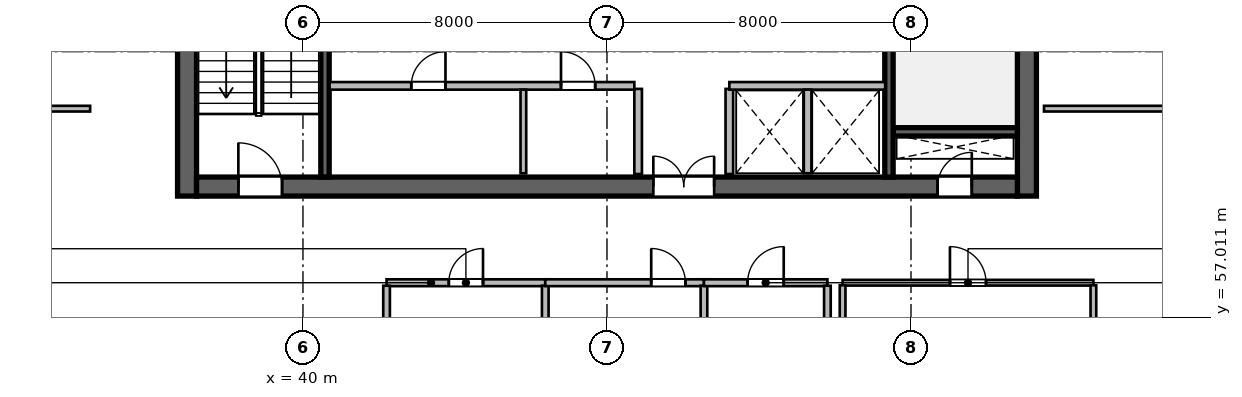
"""IFC4 building model, lengths in metres.
Left out: names, types, materials, properties, quantities, classifications, styles, units other than length and angle.
Written with IfcOpenShell. Run it as: python <this file> out.ifc"""

import sys

from ifc_helpers import new_model, si_unit, direction, frame, frame_2d, origin, place, context, subcontext, project, spatial, rectangle, extrude, source, transform, mapped, element, fill, save


model = new_model("IFC4")
c1 = context("Model", 3, precision=1e-05, world=origin(), true_north=direction((0.0, 1.0)))
c2 = subcontext(c1, "Body", "Model", "MODEL_VIEW")
j1 = project(units=[si_unit("LENGTHUNIT", "METRE"), si_unit("PLANEANGLEUNIT", "RADIAN")], contexts=[c1])
p1 = place(None, origin())
s1 = spatial("IfcSite", under=j1, at=p1, CompositionType="ELEMENT")
p2 = place(p1, origin())
s2 = spatial("IfcBuilding", under=s1, at=p2, CompositionType="ELEMENT")
p3 = place(p2, frame((0.0, 0.0, 146.7)))
s3 = spatial("IfcBuildingStorey", under=s2, at=p3, CompositionType="ELEMENT", Elevation=146.7)
m1 = source(origin(), c2, "Body", "SweptSolid", [
    extrude(rectangle(XDim=12.0, YDim=0.5, at=frame_2d((6.0, 0.0))), origin(), (0.0, 0.0, 1.0), 3.9),
])
for number, where, z_axis, x_axis in (
    (1, (36.95, 60.2, 0.0), (0.0, 0.0, 1.0), (0.0, 1.0, 0.0)),
    (2, (59.05, 60.2, 0.0), (0.0, 0.0, 1.0), (0.0, 1.0, 0.0)),
):
    element("IfcWall", number, at=place(p3, frame(where, z_axis=z_axis, x_axis=x_axis)), inside=s3, PredefinedType="SHEAR", context=c2, shape_type="MappedRepresentation", body=[
        mapped(m1, transform((0.0, 0.0, 0.0), scale=1.0)),
    ])
m2 = source(origin(), c2, "Body", "SweptSolid", [
    extrude(rectangle(XDim=21.6, YDim=0.5, at=frame_2d((10.8, 0.0))), origin(), (0.0, 0.0, 1.0), 3.9),
])
p4 = place(p3, frame((37.2, 60.45, 0.0), z_axis=(0.0, 0.0, 1.0), x_axis=(1.0, 0.0, 0.0)))
e3 = element("IfcWall", 3, at=p4, inside=s3, PredefinedType="SHEAR", context=c2, shape_type="MappedRepresentation", body=[
    mapped(m2, transform((0.0, 0.0, 0.0), scale=1.0)),
])
p5 = place(p4, frame((1.1, 0.0, 0.0)))
e4 = element("IfcOpeningElement", 4, at=p5, cuts=e3, PredefinedType="OPENING", context=c2, shape_type="SweptSolid", body=[
    extrude(rectangle(XDim=1.15, YDim=2.15, at=frame_2d((0.575, 1.075))), frame((0.0, 0.26, 0.0), z_axis=(0.0, -1.0, 0.0), x_axis=(1.0, 0.0, 0.0)), (0.0, 0.0, 1.0), 0.52),
])
p6 = place(p4, frame((19.5, 0.0, 0.0)))
e5 = element("IfcOpeningElement", 5, at=p6, cuts=e3, PredefinedType="OPENING", context=c2, shape_type="SweptSolid", body=[
    extrude(rectangle(XDim=0.9, YDim=2.1, at=frame_2d((0.45, 1.05))), frame((0.0, 0.26, 0.0), z_axis=(0.0, -1.0, 0.0), x_axis=(1.0, 0.0, 0.0)), (0.0, 0.0, 1.0), 0.52),
])
p7 = place(p4, frame((12.02, 0.0, 0.0)))
e6 = element("IfcOpeningElement", 6, at=p7, cuts=e3, PredefinedType="OPENING", context=c2, shape_type="SweptSolid", body=[
    extrude(rectangle(XDim=1.6, YDim=2.15, at=frame_2d((0.8, 1.075))), frame((0.0, 0.26, 0.0), z_axis=(0.0, -1.0, 0.0), x_axis=(1.0, 0.0, 0.0)), (0.0, 0.0, 1.0), 0.52),
])
m3 = source(origin(), c2, "Body", "SweptSolid", [
    extrude(rectangle(XDim=3.27, YDim=0.22, at=frame_2d((1.635, 0.0))), origin(), (0.0, 0.0, 1.0), 3.9),
])
p8 = place(p3, frame((55.53, 61.89, 0.0), z_axis=(0.0, 0.0, 1.0), x_axis=(1.0, 0.0, 0.0)))
e7 = element("IfcWall", 7, at=p8, inside=s3, PredefinedType="SHEAR", context=c2, shape_type="MappedRepresentation", body=[
    mapped(m3, transform((0.0, 0.0, 0.0), scale=1.0)),
])
m4 = source(origin(), c2, "Body", "SweptSolid", [
    extrude(rectangle(XDim=11.0, YDim=0.22, at=frame_2d((5.5, 0.0))), origin(), (0.0, 0.0, 1.0), 3.9),
])
p9 = place(p3, frame((40.58, 60.7, 0.0), z_axis=(0.0, 0.0, 1.0), x_axis=(0.0, 1.0, 0.0)))
e8 = element("IfcWall", 8, at=p9, inside=s3, PredefinedType="SHEAR", context=c2, shape_type="MappedRepresentation", body=[
    mapped(m4, transform((0.0, 0.0, 0.0), scale=1.0)),
])
p10 = place(p3, frame((55.42, 60.7, 0.0), z_axis=(0.0, 0.0, 1.0), x_axis=(0.0, 1.0, 0.0)))
e9 = element("IfcWall", 9, at=p10, inside=s3, PredefinedType="SHEAR", context=c2, shape_type="MappedRepresentation", body=[
    mapped(m4, transform((0.0, 0.0, 0.0), scale=1.0)),
])
p11 = place(p10, frame((9.545, 0.0, 0.0)))
e10 = element("IfcOpeningElement", 10, at=p11, cuts=e9, PredefinedType="OPENING", context=c2, shape_type="SweptSolid", body=[
    extrude(rectangle(XDim=1.15, YDim=2.15, at=frame_2d((0.575, 1.075))), frame((0.0, 0.12, 0.0), z_axis=(0.0, -1.0, 0.0), x_axis=(1.0, 0.0, 0.0)), (0.0, 0.0, 1.0), 0.24),
])
m5 = source(origin(), c2, "Body", "SweptSolid", [
    extrude(rectangle(XDim=2.24, YDim=0.2, at=frame_2d((1.12, 0.0))), origin(), (0.0, 0.0, 1.0), 3.65),
])
for number, where, z_axis, x_axis in (
    (11, (48.82, 60.78, 0.0), (0.0, 0.0, 1.0), (0.0, 1.0, 0.0)),
    (12, (51.22, 60.78, 0.0), (0.0, 0.0, 1.0), (0.0, 1.0, 0.0)),
):
    element("IfcWall", number, at=place(p3, frame(where, z_axis=z_axis, x_axis=x_axis)), inside=s3, PredefinedType="SOLIDWALL", context=c2, shape_type="MappedRepresentation", body=[
        mapped(m5, transform((0.0, 0.0, 0.0), scale=1.0)),
    ])
m6 = source(origin(), c2, "Body", "SweptSolid", [
    extrude(rectangle(XDim=8.02, YDim=0.2, at=frame_2d((4.01, 0.0))), origin(), (0.0, 0.0, 1.0), 3.65),
])
p12 = place(p3, frame((40.7, 63.1, 0.0), z_axis=(0.0, 0.0, 1.0), x_axis=(1.0, 0.0, 0.0)))
e13 = element("IfcWall", 13, at=p12, inside=s3, PredefinedType="SOLIDWALL", context=c2, shape_type="MappedRepresentation", body=[
    mapped(m6, transform((0.0, 0.0, 0.0), scale=1.0)),
])
p13 = place(p12, frame((2.15, 0.0, 0.0)))
e14 = element("IfcOpeningElement", 14, at=p13, cuts=e13, PredefinedType="OPENING", context=c2, shape_type="SweptSolid", body=[
    extrude(rectangle(XDim=0.9, YDim=2.1, at=frame_2d((0.45, 1.05))), frame((0.0, 0.11, 0.0), z_axis=(0.0, -1.0, 0.0), x_axis=(1.0, 0.0, 0.0)), (0.0, 0.0, 1.0), 0.22),
])
p14 = place(p12, frame((6.09, 0.0, 0.0)))
e15 = element("IfcOpeningElement", 15, at=p14, cuts=e13, PredefinedType="OPENING", context=c2, shape_type="SweptSolid", body=[
    extrude(rectangle(XDim=0.9, YDim=2.1, at=frame_2d((0.45, 1.05))), frame((0.0, 0.11, 0.0), z_axis=(0.0, -1.0, 0.0), x_axis=(1.0, 0.0, 0.0)), (0.0, 0.0, 1.0), 0.22),
])
m7 = source(origin(), c2, "Body", "SweptSolid", [
    extrude(rectangle(XDim=4.1, YDim=0.2, at=frame_2d((2.05, 0.0))), origin(), (0.0, 0.0, 1.0), 3.65),
])
p15 = place(p3, frame((51.22, 63.1, 0.0), z_axis=(0.0, 0.0, 1.0), x_axis=(1.0, 0.0, 0.0)))
e16 = element("IfcWall", 16, at=p15, inside=s3, PredefinedType="SOLIDWALL", context=c2, shape_type="MappedRepresentation", body=[
    mapped(m7, transform((0.0, 0.0, 0.0), scale=1.0)),
])
m8 = source(origin(), c2, "Body", "SweptSolid", [
    extrude(rectangle(XDim=2.2, YDim=0.15, at=frame_2d((1.1, 0.0))), origin(), (0.0, 0.0, 1.0), 3.65),
])
p16 = place(p3, frame((45.8, 60.8, 0.0), z_axis=(0.0, 0.0, 1.0), x_axis=(0.0, 1.0, 0.0)))
e17 = element("IfcWall", 17, at=p16, inside=s3, PredefinedType="PARTITIONING", context=c2, shape_type="MappedRepresentation", body=[
    mapped(m8, transform((0.0, 0.0, 0.0), scale=1.0)),
])
m9 = source(origin(), c2, "Body", "SweptSolid", [
    extrude(rectangle(XDim=2.2, YDim=0.2, at=frame_2d((1.1, 0.0))), origin(), (0.0, 0.0, 1.0), 3.65),
])
p17 = place(p3, frame((53.28, 60.8, 0.0), z_axis=(0.0, 0.0, 1.0), x_axis=(0.0, 1.0, 0.0)))
e18 = element("IfcWall", 18, at=p17, inside=s3, PredefinedType="SOLIDWALL", context=c2, shape_type="MappedRepresentation", body=[
    mapped(m9, transform((0.0, 0.0, 0.0), scale=1.0)),
])
m10 = source(origin(), c2, "Body", "SweptSolid", [
    extrude(rectangle(XDim=4.176, YDim=0.18, at=frame_2d((2.088, 0.0))), origin(), (0.0, 0.0, 1.0), 3.65),
])
p18 = place(p3, frame((42.2, 57.92, 0.0), z_axis=(0.0, 0.0, 1.0), x_axis=(1.0, 0.0, 0.0)))
e19 = element("IfcWall", 19, at=p18, inside=s3, PredefinedType="PLUMBINGWALL", context=c2, shape_type="MappedRepresentation", body=[
    mapped(m10, transform((0.0, 0.0, 0.0), scale=1.0)),
])
p19 = place(p18, frame((1.638, 0.0, 0.0)))
e20 = element("IfcOpeningElement", 20, at=p19, cuts=e19, PredefinedType="OPENING", context=c2, shape_type="SweptSolid", body=[
    extrude(rectangle(XDim=0.9, YDim=2.08, at=frame_2d((0.45, 1.04))), frame((0.0, 0.1, 0.0), z_axis=(0.0, -1.0, 0.0), x_axis=(1.0, 0.0, 0.0)), (0.0, 0.0, 1.0), 0.2),
])
m11 = source(origin(), c2, "Body", "SweptSolid", [
    extrude(rectangle(XDim=3.763, YDim=0.175, at=frame_2d((1.881, 0.0))), origin(), (0.0, 0.0, 1.0), 3.65),
])
p20 = place(p3, frame((42.2, 54.079, 0.0), z_axis=(0.0, 0.0, 1.0), x_axis=(0.0, 1.0, 0.0)))
e21 = element("IfcWall", 21, at=p20, inside=s3, PredefinedType="PARTITIONING", context=c2, shape_type="MappedRepresentation", body=[
    mapped(m11, transform((0.0, 0.0, 0.0), scale=1.0)),
])
m12 = source(origin(), c2, "Body", "SweptSolid", [
    extrude(rectangle(XDim=3.065, YDim=0.175, at=frame_2d((1.533, 0.0))), origin(), (0.0, 0.0, 1.0), 3.65),
])
p21 = place(p3, frame((46.376, 54.776, 0.0), z_axis=(0.0, 0.0, 1.0), x_axis=(0.0, 1.0, 0.0)))
e22 = element("IfcWall", 22, at=p21, inside=s3, PredefinedType="PARTITIONING", context=c2, shape_type="MappedRepresentation", body=[
    mapped(m12, transform((0.0, 0.0, 0.0), scale=1.0)),
])
p22 = place(p3, frame((46.376, 57.92, 0.0), z_axis=(0.0, 0.0, 1.0), x_axis=(1.0, 0.0, 0.0)))
e23 = element("IfcWall", 23, at=p22, inside=s3, PredefinedType="PLUMBINGWALL", context=c2, shape_type="MappedRepresentation", body=[
    mapped(m10, transform((0.0, 0.0, 0.0), scale=1.0)),
])
p23 = place(p22, frame((2.788, 0.0, 0.0)))
e24 = element("IfcOpeningElement", 24, at=p23, cuts=e23, PredefinedType="OPENING", context=c2, shape_type="SweptSolid", body=[
    extrude(rectangle(XDim=0.9, YDim=2.08, at=frame_2d((0.45, 1.04))), frame((0.0, 0.1, 0.0), z_axis=(0.0, -1.0, 0.0), x_axis=(1.0, 0.0, 0.0)), (0.0, 0.0, 1.0), 0.2),
])
m13 = source(origin(), c2, "Body", "SweptSolid", [
    extrude(rectangle(XDim=3.136, YDim=0.175, at=frame_2d((1.568, 0.0))), origin(), (0.0, 0.0, 1.0), 3.65),
])
p24 = place(p3, frame((50.552, 54.705, 0.0), z_axis=(0.0, 0.0, 1.0), x_axis=(0.0, 1.0, 0.0)))
e25 = element("IfcWall", 25, at=p24, inside=s3, PredefinedType="PARTITIONING", context=c2, shape_type="MappedRepresentation", body=[
    mapped(m13, transform((0.0, 0.0, 0.0), scale=1.0)),
])
m14 = source(origin(), c2, "Body", "SweptSolid", [
    extrude(rectangle(XDim=3.248, YDim=0.18, at=frame_2d((1.624, 0.0))), origin(), (0.0, 0.0, 1.0), 3.65),
])
p25 = place(p3, frame((50.552, 57.92, 0.0), z_axis=(0.0, 0.0, 1.0), x_axis=(1.0, 0.0, 0.0)))
e26 = element("IfcWall", 26, at=p25, inside=s3, PredefinedType="PLUMBINGWALL", context=c2, shape_type="MappedRepresentation", body=[
    mapped(m14, transform((0.0, 0.0, 0.0), scale=1.0)),
])
p26 = place(p25, frame((1.149, 0.0, 0.0)))
e27 = element("IfcOpeningElement", 27, at=p26, cuts=e26, PredefinedType="OPENING", context=c2, shape_type="SweptSolid", body=[
    extrude(rectangle(XDim=0.95, YDim=2.12, at=frame_2d((0.475, 1.06))), frame((0.0, 0.1, 0.0), z_axis=(0.0, -1.0, 0.0), x_axis=(1.0, 0.0, 0.0)), (0.0, 0.0, 1.0), 0.2),
])
p27 = place(p3, frame((53.8, 54.079, 0.0), z_axis=(0.0, 0.0, 1.0), x_axis=(0.0, 1.0, 0.0)))
e28 = element("IfcWall", 28, at=p27, inside=s3, PredefinedType="PARTITIONING", context=c2, shape_type="MappedRepresentation", body=[
    mapped(m11, transform((0.0, 0.0, 0.0), scale=1.0)),
])
m15 = source(origin(), c2, "Body", "SweptSolid", [
    extrude(rectangle(XDim=6.6, YDim=0.15, at=frame_2d((3.3, 0.0))), origin(), (0.0, 0.0, 1.0), 3.65),
])
p28 = place(p3, frame((54.2, 57.92, 0.0), z_axis=(0.0, 0.0, 1.0), x_axis=(1.0, 0.0, 0.0)))
e29 = element("IfcWall", 29, at=p28, inside=s3, PredefinedType="PARTITIONING", context=c2, shape_type="MappedRepresentation", body=[
    mapped(m15, transform((0.0, 0.0, 0.0), scale=1.0)),
])
p29 = place(p28, frame((2.825, 0.0, 0.0)))
e30 = element("IfcOpeningElement", 30, at=p29, cuts=e29, PredefinedType="OPENING", context=c2, shape_type="SweptSolid", body=[
    extrude(rectangle(XDim=0.95, YDim=2.1, at=frame_2d((0.475, 1.05))), frame((0.0, 0.085, 0.0), z_axis=(0.0, -1.0, 0.0), x_axis=(1.0, 0.0, 0.0)), (0.0, 0.0, 1.0), 0.17),
])
m16 = source(origin(), c2, "Body", "SweptSolid", [
    extrude(rectangle(XDim=3.785, YDim=0.15, at=frame_2d((1.893, 0.0))), origin(), (0.0, 0.0, 1.0), 3.65),
])
for number, where, z_axis, x_axis in (
    (31, (54.2, 54.067, 0.0), (0.0, 0.0, 1.0), (0.0, 1.0, 0.0)),
    (32, (60.8, 54.067, 0.0), (0.0, 0.0, 1.0), (0.0, 1.0, 0.0)),
):
    element("IfcWall", number, at=place(p3, frame(where, z_axis=z_axis, x_axis=x_axis)), inside=s3, PredefinedType="PARTITIONING", context=c2, shape_type="MappedRepresentation", body=[
        mapped(m16, transform((0.0, 0.0, 0.0), scale=1.0)),
    ])
m17 = source(origin(), c2, "Body", "SweptSolid", [
    extrude(rectangle(XDim=2.46, YDim=0.15, at=frame_2d((1.23, 0.0))), origin(), (0.0, 0.0, 1.0), 3.65),
])
p30 = place(p3, frame((31.94, 62.5, 0.0), z_axis=(0.0, 0.0, 1.0), x_axis=(1.0, 0.0, 0.0)))
e33 = element("IfcWall", 33, at=p30, inside=s3, PredefinedType="PARTITIONING", context=c2, shape_type="MappedRepresentation", body=[
    mapped(m17, transform((0.0, 0.0, 0.0), scale=1.0)),
])
m18 = source(origin(), c2, "Body", "SweptSolid", [
    extrude(rectangle(XDim=4.56, YDim=0.15, at=frame_2d((2.28, 0.0))), origin(), (0.0, 0.0, 1.0), 3.65),
])
p31 = place(p3, frame((59.5, 62.5, 0.0), z_axis=(0.0, 0.0, 1.0), x_axis=(1.0, 0.0, 0.0)))
e34 = element("IfcWall", 34, at=p31, inside=s3, PredefinedType="PARTITIONING", context=c2, shape_type="MappedRepresentation", body=[
    mapped(m18, transform((0.0, 0.0, 0.0), scale=1.0)),
])
m19 = source(origin(), c2, "Body", "SweptSolid", [
    extrude(rectangle(XDim=1.15, YDim=2.15, at=frame_2d((0.575, 1.075))), frame((0.0, 0.025, 0.0), z_axis=(0.0, -1.0, 0.0), x_axis=(1.0, 0.0, 0.0)), (0.0, 0.0, 1.0), 0.05),
])
p32 = place(p5, origin())
e35 = element("IfcDoor", 35, at=p32, inside=s3, OperationType="SINGLE_SWING_LEFT", PredefinedType="DOOR", context=c2, shape_type="MappedRepresentation", body=[
    mapped(m19, transform((0.0, 0.0, 0.0), scale=1.0)),
])
fill(e4, e35)
m20 = source(origin(), c2, "Body", "SweptSolid", [
    extrude(rectangle(XDim=0.9, YDim=2.1, at=frame_2d((0.45, 1.05))), frame((0.0, 0.025, 0.0), z_axis=(0.0, -1.0, 0.0), x_axis=(1.0, 0.0, 0.0)), (0.0, 0.0, 1.0), 0.05),
])
p33 = place(p6, origin())
e36 = element("IfcDoor", 36, at=p33, inside=s3, OperationType="SINGLE_SWING_RIGHT", PredefinedType="DOOR", context=c2, shape_type="MappedRepresentation", body=[
    mapped(m20, transform((0.0, 0.0, 0.0), scale=1.0)),
])
fill(e5, e36)
m21 = source(origin(), c2, "Body", "SweptSolid", [
    extrude(rectangle(XDim=1.6, YDim=2.15, at=frame_2d((0.8, 1.075))), frame((0.0, 0.025, 0.0), z_axis=(0.0, -1.0, 0.0), x_axis=(1.0, 0.0, 0.0)), (0.0, 0.0, 1.0), 0.05),
])
p34 = place(p7, origin())
e37 = element("IfcDoor", 37, at=p34, inside=s3, OperationType="DOUBLE_DOOR_SINGLE_SWING", PredefinedType="DOOR", context=c2, shape_type="MappedRepresentation", body=[
    mapped(m21, transform((0.0, 0.0, 0.0), scale=1.0)),
])
fill(e6, e37)
p35 = place(p13, origin())
e38 = element("IfcDoor", 38, at=p35, inside=s3, OperationType="SINGLE_SWING_RIGHT", PredefinedType="DOOR", context=c2, shape_type="MappedRepresentation", body=[
    mapped(m20, transform((0.0, 0.0, 0.0), scale=1.0)),
])
fill(e14, e38)
p36 = place(p14, origin())
e39 = element("IfcDoor", 39, at=p36, inside=s3, OperationType="SINGLE_SWING_LEFT", PredefinedType="DOOR", context=c2, shape_type="MappedRepresentation", body=[
    mapped(m20, transform((0.0, 0.0, 0.0), scale=1.0)),
])
fill(e15, e39)
m22 = source(origin(), c2, "Body", "SweptSolid", [
    extrude(rectangle(XDim=0.9, YDim=2.08, at=frame_2d((0.45, 1.04))), frame((0.0, 0.025, 0.0), z_axis=(0.0, -1.0, 0.0), x_axis=(1.0, 0.0, 0.0)), (0.0, 0.0, 1.0), 0.05),
])
p37 = place(p19, origin())
e40 = element("IfcDoor", 40, at=p37, inside=s3, OperationType="SINGLE_SWING_RIGHT", PredefinedType="DOOR", context=c2, shape_type="MappedRepresentation", body=[
    mapped(m22, transform((0.0, 0.0, 0.0), scale=1.0)),
])
fill(e20, e40)
p38 = place(p23, origin())
e41 = element("IfcDoor", 41, at=p38, inside=s3, OperationType="SINGLE_SWING_LEFT", PredefinedType="DOOR", context=c2, shape_type="MappedRepresentation", body=[
    mapped(m22, transform((0.0, 0.0, 0.0), scale=1.0)),
])
fill(e24, e41)
m23 = source(origin(), c2, "Body", "SweptSolid", [
    extrude(rectangle(XDim=0.95, YDim=2.12, at=frame_2d((0.475, 1.06))), frame((0.0, 0.025, 0.0), z_axis=(0.0, -1.0, 0.0), x_axis=(1.0, 0.0, 0.0)), (0.0, 0.0, 1.0), 0.05),
])
p39 = place(p26, origin())
e42 = element("IfcDoor", 42, at=p39, inside=s3, OperationType="SINGLE_SWING_RIGHT", PredefinedType="DOOR", context=c2, shape_type="MappedRepresentation", body=[
    mapped(m23, transform((0.0, 0.0, 0.0), scale=1.0)),
])
fill(e27, e42)
m24 = source(origin(), c2, "Body", "SweptSolid", [
    extrude(rectangle(XDim=0.95, YDim=2.1, at=frame_2d((0.475, 1.05))), frame((0.0, 0.025, 0.0), z_axis=(0.0, -1.0, 0.0), x_axis=(1.0, 0.0, 0.0)), (0.0, 0.0, 1.0), 0.05),
])
p40 = place(p29, origin())
e43 = element("IfcDoor", 43, at=p40, inside=s3, OperationType="SINGLE_SWING_LEFT", PredefinedType="DOOR", context=c2, shape_type="MappedRepresentation", body=[
    mapped(m24, transform((0.0, 0.0, 0.0), scale=1.0)),
])
fill(e30, e43)
save(model, sys.argv[1])
